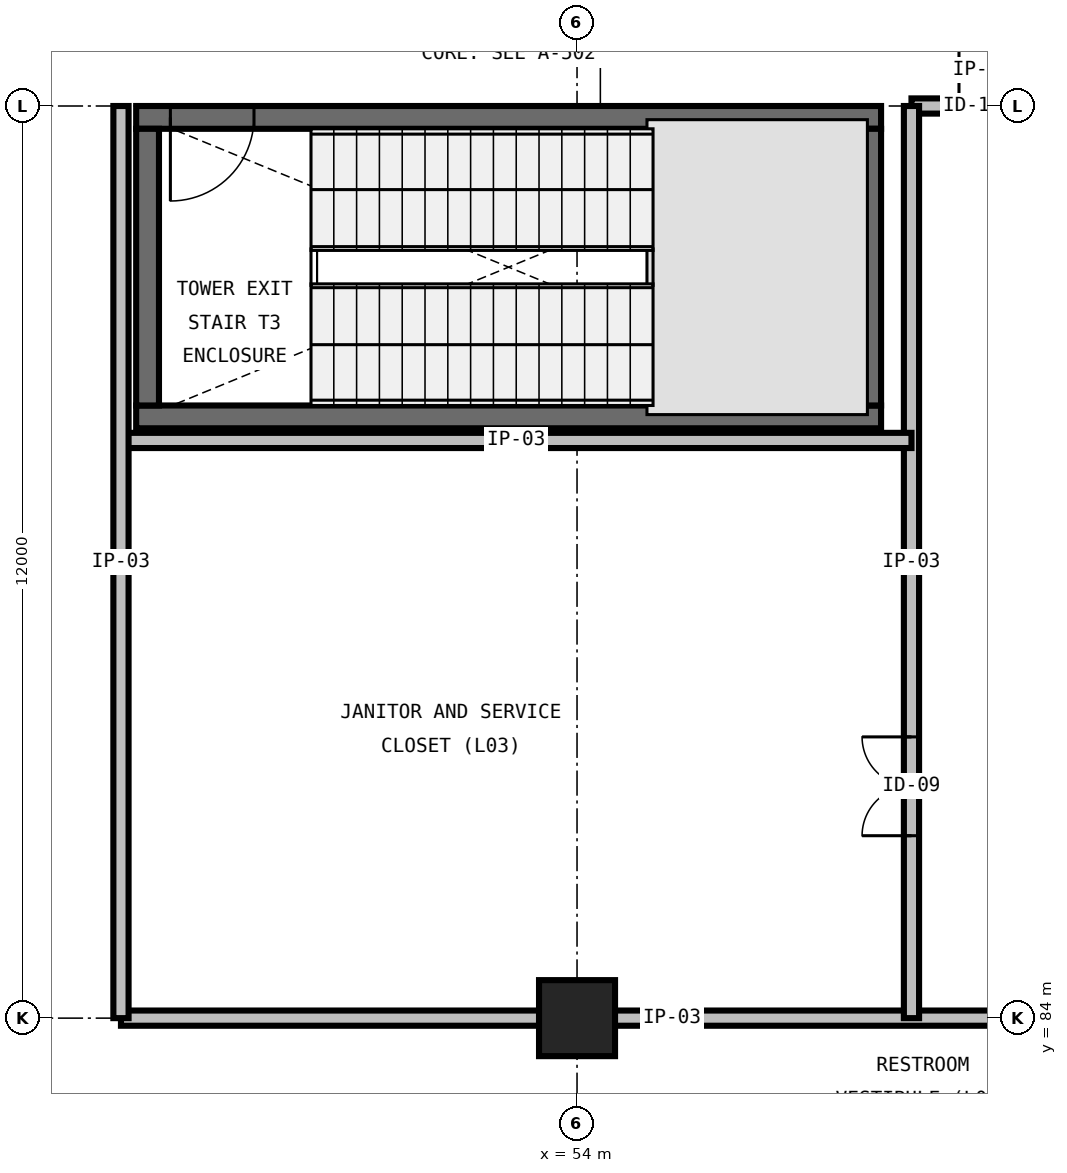
"""IFC4 building model, lengths in metres.
Left out: names, types, materials, properties, quantities, classifications, styles, units other than length and angle.
Written with IfcOpenShell. Run it as: python <this file> out.ifc"""

import sys

from ifc_helpers import new_model, si_unit, direction, frame, frame_2d, origin, origin_2d, place, context, subcontext, project, spatial, rectangle, extrude, element, fill, save


model = new_model("IFC4")
c1 = context("Model", 3, precision=1e-05, world=origin(), true_north=direction((0.0, 1.0)))
c2 = subcontext(c1, "Body", "Model", "MODEL_VIEW")
j1 = project(units=[si_unit("LENGTHUNIT", "METRE"), si_unit("PLANEANGLEUNIT", "RADIAN")], contexts=[c1])
p1 = place(None, origin())
s1 = spatial("IfcSite", under=j1, at=p1, CompositionType="ELEMENT")
p2 = place(p1, origin())
s2 = spatial("IfcBuilding", under=s1, at=p2, CompositionType="ELEMENT")
p3 = place(p2, frame((0.0, 0.0, 18.0)))
s3 = spatial("IfcBuildingStorey", under=s2, at=p3, CompositionType="ELEMENT", Elevation=18.0)
p4 = place(p3, frame((54.0, 84.0, 0.0), z_axis=(0.0, 0.0, 1.0), x_axis=(1.0, 0.0, 0.0)))
e1 = element("IfcColumn", 1, at=p4, inside=s3, PredefinedType="COLUMN", context=c2, shape_type="SweptSolid", body=[
    extrude(rectangle(XDim=1.0, YDim=1.0, at=origin_2d()), origin(), (0.0, 0.0, 1.0), 5.4),
])
p5 = place(p3, frame((48.2, 91.91, 0.0), z_axis=(0.0, 0.0, 1.0), x_axis=(1.0, 0.0, 0.0)))
e2 = element("IfcWall", 2, at=p5, inside=s3, PredefinedType="SHEAR", context=c2, shape_type="SweptSolid", body=[
    extrude(rectangle(XDim=9.8, YDim=0.3, at=frame_2d((4.9, 0.0))), origin(), (0.0, 0.0, 1.0), 5.4),
])
p6 = place(p3, frame((58.0, 95.85, 0.0), z_axis=(0.0, 0.0, 1.0), x_axis=(-1.0, 0.0, 0.0)))
e3 = element("IfcWall", 3, at=p6, inside=s3, PredefinedType="SHEAR", context=c2, shape_type="SweptSolid", body=[
    extrude(rectangle(XDim=9.8, YDim=0.3, at=frame_2d((4.9, 0.0))), origin(), (0.0, 0.0, 1.0), 5.4),
])
p7 = place(p6, frame((8.25, 0.0, 0.0)))
e4 = element("IfcOpeningElement", 4, at=p7, cuts=e3, PredefinedType="OPENING", context=c2, shape_type="SweptSolid", body=[
    extrude(rectangle(XDim=1.1, YDim=2.2, at=frame_2d((0.55, 1.1))), frame((0.0, 0.165, 0.0), z_axis=(0.0, -1.0, 0.0), x_axis=(1.0, 0.0, 0.0)), (0.0, 0.0, 1.0), 0.33),
])
for number, where, z_axis, x_axis in (
    (5, (48.35, 95.7, 0.0), (0.0, 0.0, 1.0), (0.0, -1.0, 0.0)),
    (6, (57.85, 92.06, 0.0), (0.0, 0.0, 1.0), (0.0, 1.0, 0.0)),
):
    element("IfcWall", number, at=place(p3, frame(where, z_axis=z_axis, x_axis=x_axis)), inside=s3, PredefinedType="SHEAR", context=c2, shape_type="SweptSolid", body=[
        extrude(rectangle(XDim=3.64, YDim=0.3, at=frame_2d((1.82, 0.0))), origin(), (0.0, 0.0, 1.0), 5.4),
    ])
p8 = place(p3, frame((48.0, 84.0, 0.0), z_axis=(0.0, 0.0, 1.0), x_axis=(1.0, 0.0, 0.0)))
e7 = element("IfcWall", 7, at=p8, inside=s3, PredefinedType="PARTITIONING", context=c2, shape_type="SweptSolid", body=[
    extrude(rectangle(XDim=18.0, YDim=0.2, at=frame_2d((9.0, 0.0))), origin(), (0.0, 0.0, 1.0), 4.302),
])
p9 = place(p3, frame((58.4, 96.0, 0.0), z_axis=(0.0, 0.0, 1.0), x_axis=(1.0, 0.0, 0.0)))
e8 = element("IfcWall", 8, at=p9, inside=s3, PredefinedType="PARTITIONING", context=c2, shape_type="SweptSolid", body=[
    extrude(rectangle(XDim=2.4, YDim=0.2, at=frame_2d((1.2, 0.0))), origin(), (0.0, 0.0, 1.0), 4.149),
])
p10 = place(p9, frame((0.625, 0.0, 0.0)))
e9 = element("IfcOpeningElement", 9, at=p10, cuts=e8, PredefinedType="OPENING", context=c2, shape_type="SweptSolid", body=[
    extrude(rectangle(XDim=0.95, YDim=2.15, at=frame_2d((0.475, 1.075))), frame((0.0, 0.115, 0.0), z_axis=(0.0, -1.0, 0.0), x_axis=(1.0, 0.0, 0.0)), (0.0, 0.0, 1.0), 0.23),
])
p11 = place(p3, frame((58.4, 84.0, 0.0), z_axis=(0.0, 0.0, 1.0), x_axis=(0.0, 1.0, 0.0)))
e10 = element("IfcWall", 10, at=p11, inside=s3, PredefinedType="PARTITIONING", context=c2, shape_type="SweptSolid", body=[
    extrude(rectangle(XDim=12.0, YDim=0.2, at=frame_2d((6.0, 0.0))), origin(), (0.0, 0.0, 1.0), 5.08),
])
p12 = place(p11, frame((2.4, 0.0, 0.0)))
e11 = element("IfcOpeningElement", 11, at=p12, cuts=e10, PredefinedType="OPENING", context=c2, shape_type="SweptSolid", body=[
    extrude(rectangle(XDim=1.3, YDim=2.2, at=frame_2d((0.65, 1.1))), frame((0.0, 0.115, 0.0), z_axis=(0.0, -1.0, 0.0), x_axis=(1.0, 0.0, 0.0)), (0.0, 0.0, 1.0), 0.23),
])
p13 = place(p3, frame((48.0, 91.6, 0.0), z_axis=(0.0, 0.0, 1.0), x_axis=(1.0, 0.0, 0.0)))
e12 = element("IfcWall", 12, at=p13, inside=s3, PredefinedType="PARTITIONING", context=c2, shape_type="SweptSolid", body=[
    extrude(rectangle(XDim=10.4, YDim=0.2, at=frame_2d((5.2, 0.0))), origin(), (0.0, 0.0, 1.0), 5.08),
])
p14 = place(p3, frame((48.0, 84.0, 0.0), z_axis=(0.0, 0.0, 1.0), x_axis=(0.0, 1.0, 0.0)))
e13 = element("IfcWall", 13, at=p14, inside=s3, PredefinedType="PARTITIONING", context=c2, shape_type="SweptSolid", body=[
    extrude(rectangle(XDim=12.0, YDim=0.2, at=frame_2d((6.0, 0.0))), origin(), (0.0, 0.0, 1.0), 5.08),
])
p15 = place(p7, origin())
e14 = element("IfcDoor", 14, at=p15, inside=s3, OperationType="SINGLE_SWING_RIGHT", PredefinedType="DOOR", context=c2, shape_type="SweptSolid", body=[
    extrude(rectangle(XDim=1.1, YDim=2.2, at=frame_2d((0.55, 1.1))), frame((0.0, 0.025, 0.0), z_axis=(0.0, -1.0, 0.0), x_axis=(1.0, 0.0, 0.0)), (0.0, 0.0, 1.0), 0.05),
])
fill(e4, e14)
p16 = place(p10, origin())
e15 = element("IfcDoor", 15, at=p16, inside=s3, OperationType="SINGLE_SWING_LEFT", PredefinedType="DOOR", context=c2, shape_type="SweptSolid", body=[
    extrude(rectangle(XDim=0.95, YDim=2.15, at=frame_2d((0.475, 1.075))), frame((0.0, 0.025, 0.0), z_axis=(0.0, -1.0, 0.0), x_axis=(1.0, 0.0, 0.0)), (0.0, 0.0, 1.0), 0.05),
])
fill(e9, e15)
p17 = place(p12, origin())
e16 = element("IfcDoor", 16, at=p17, inside=s3, OperationType="DOUBLE_DOOR_SINGLE_SWING", PredefinedType="DOOR", context=c2, shape_type="SweptSolid", body=[
    extrude(rectangle(XDim=1.3, YDim=2.2, at=frame_2d((0.65, 1.1))), frame((0.0, 0.025, 0.0), z_axis=(0.0, -1.0, 0.0), x_axis=(1.0, 0.0, 0.0)), (0.0, 0.0, 1.0), 0.05),
])
fill(e11, e16)
save(model, sys.argv[1])
